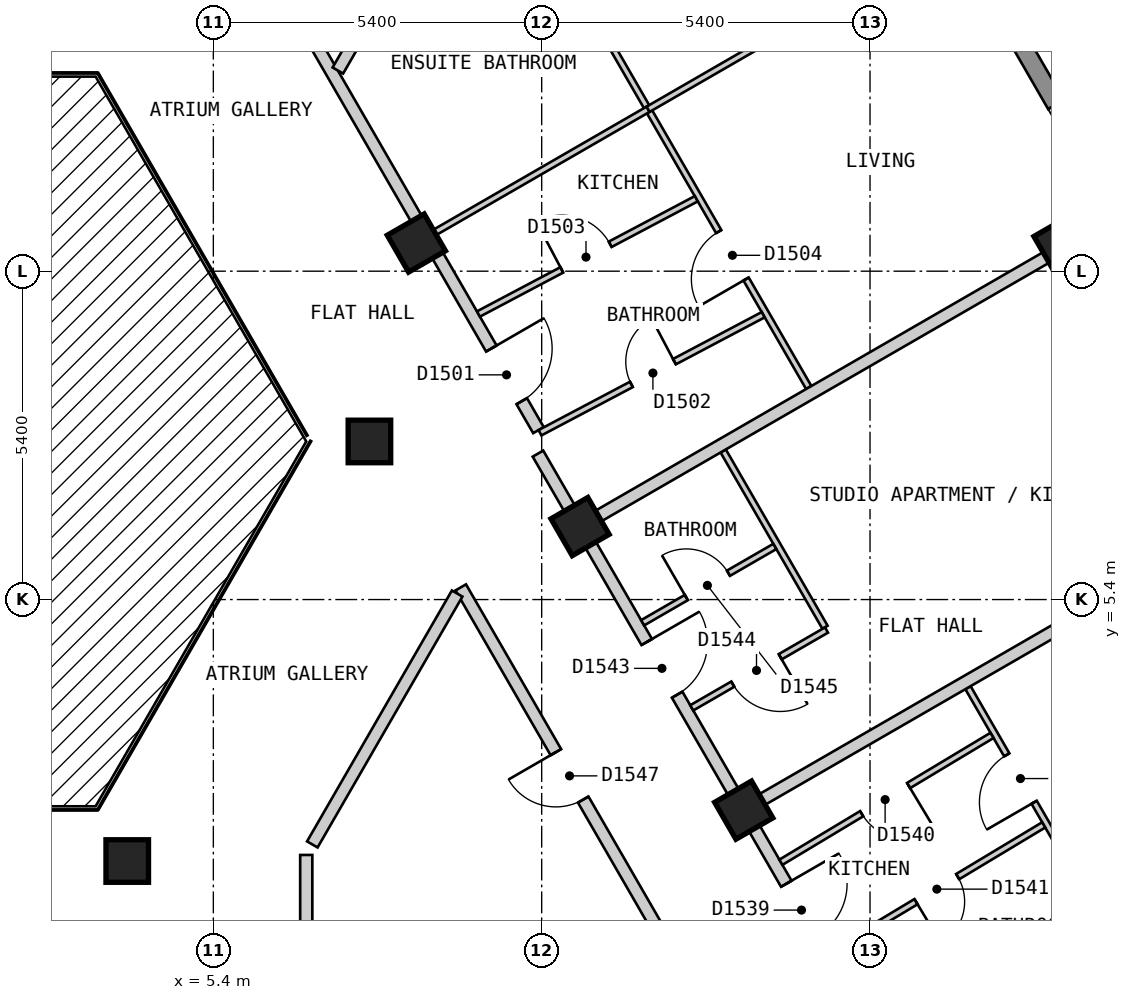
"""IFC4 building model, lengths in metres.
Left out: names, types, materials, properties, quantities, classifications, styles, units other than length and angle.
Written with IfcOpenShell. Run it as: python <this file> out.ifc"""

import sys

from ifc_helpers import new_model, si_unit, direction, frame, frame_2d, origin, origin_2d, place, context, subcontext, project, spatial, polyline, rectangle, outline, extrude, element, fill, save


model = new_model("IFC4")
c1 = context("Model", 3, precision=1e-05, world=origin(), true_north=direction((0.0, 1.0)))
c2 = subcontext(c1, "Body", "Model", "MODEL_VIEW")
j1 = project(units=[si_unit("LENGTHUNIT", "METRE"), si_unit("PLANEANGLEUNIT", "RADIAN")], contexts=[c1])
p1 = place(None, origin())
s1 = spatial("IfcSite", under=j1, at=p1, CompositionType="ELEMENT")
p2 = place(p1, origin())
s2 = spatial("IfcBuilding", under=s1, at=p2, CompositionType="ELEMENT")
p3 = place(p2, frame((0.0, 0.0, 184.2)))
s3 = spatial("IfcBuildingStorey", under=s2, at=p3, CompositionType="ELEMENT", Elevation=184.2)
p4 = place(p3, frame((19.442, 11.225, 0.0), z_axis=(0.0, 0.0, 1.0), x_axis=(-0.5, 0.866025403784, 0.0)))
e1 = element("IfcColumn", 1, at=p4, inside=s3, PredefinedType="COLUMN", context=c2, shape_type="SweptSolid", body=[
    extrude(rectangle(XDim=0.8, YDim=0.8, at=origin_2d()), origin(), (0.0, 0.0, 1.0), 3.0),
])
for number, where, z_axis, x_axis in (
    (2, (14.123, 1.937, 0.0), (0.0, 0.0, 1.0), (-0.5, 0.866, 0.0)),
    (3, (3.984, 1.1, 0.0), (0.0, 0.0, 1.0), (1.0, 0.0, 0.0)),
    (4, (11.431, 6.6, 0.0), (0.0, 0.0, 1.0), (-0.5, 0.866, 0.0)),
    (5, (7.967, 8.0, 0.0), (0.0, 0.0, 1.0), (1.0, 0.0, 0.0)),
    (6, (8.739, 11.263, 0.0), (0.0, 0.0, 1.0), (-0.5, 0.866, 0.0)),
):
    element("IfcColumn", number, at=place(p3, frame(where, z_axis=z_axis, x_axis=x_axis)), inside=s3, PredefinedType="COLUMN", context=c2, shape_type="SweptSolid", body=[
        extrude(rectangle(XDim=0.7, YDim=0.7, at=origin_2d()), origin(), (0.0, 0.0, 1.0), 3.0),
    ])
p5 = place(p3, frame((26.024, 1.825, 0.0), z_axis=(0.0, 0.0, 1.0), x_axis=(-0.500010537973, 0.866019319597, 0.0)))
e7 = element("IfcWall", 7, at=p5, inside=s3, PredefinedType="SOLIDWALL", context=c2, shape_type="SweptSolid", body=[
    extrude(outline(polyline([(0.0, -0.15), (22.863, -0.15), (22.783, 0.15), (0.08, 0.15), (0.0, -0.15)])), origin(), (0.0, 0.0, 1.0), 2.7),
])
p6 = place(p5, frame((1.259, 0.0, 0.15)))
e8 = element("IfcOpeningElement", 8, at=p6, cuts=e7, PredefinedType="OPENING", context=c2, shape_type="SweptSolid", body=[
    extrude(rectangle(XDim=1.5, YDim=2.1, at=frame_2d((0.75, 1.05))), frame((0.0, 0.16, 0.0), z_axis=(0.0, -1.0, 0.0), x_axis=(1.0, 0.0, 0.0)), (0.0, 0.0, 1.0), 0.32),
])
p7 = place(p5, frame((3.952, 0.0, 0.15)))
e9 = element("IfcOpeningElement", 9, at=p7, cuts=e7, PredefinedType="OPENING", context=c2, shape_type="SweptSolid", body=[
    extrude(rectangle(XDim=1.5, YDim=2.1, at=frame_2d((0.75, 1.05))), frame((0.0, 0.16, 0.0), z_axis=(0.0, -1.0, 0.0), x_axis=(1.0, 0.0, 0.0)), (0.0, 0.0, 1.0), 0.32),
])
p8 = place(p5, frame((6.644, 0.0, 0.15)))
e10 = element("IfcOpeningElement", 10, at=p8, cuts=e7, PredefinedType="OPENING", context=c2, shape_type="SweptSolid", body=[
    extrude(rectangle(XDim=1.5, YDim=2.1, at=frame_2d((0.75, 1.05))), frame((0.0, 0.16, 0.0), z_axis=(0.0, -1.0, 0.0), x_axis=(1.0, 0.0, 0.0)), (0.0, 0.0, 1.0), 0.32),
])
p9 = place(p5, frame((9.335, 0.0, 0.15)))
e11 = element("IfcOpeningElement", 11, at=p9, cuts=e7, PredefinedType="OPENING", context=c2, shape_type="SweptSolid", body=[
    extrude(rectangle(XDim=1.5, YDim=2.1, at=frame_2d((0.75, 1.05))), frame((0.0, 0.16, 0.0), z_axis=(0.0, -1.0, 0.0), x_axis=(1.0, 0.0, 0.0)), (0.0, 0.0, 1.0), 0.32),
])
p10 = place(p5, frame((12.028, 0.0, 0.15)))
e12 = element("IfcOpeningElement", 12, at=p10, cuts=e7, PredefinedType="OPENING", context=c2, shape_type="SweptSolid", body=[
    extrude(rectangle(XDim=1.5, YDim=2.1, at=frame_2d((0.75, 1.05))), frame((0.0, 0.16, 0.0), z_axis=(0.0, -1.0, 0.0), x_axis=(1.0, 0.0, 0.0)), (0.0, 0.0, 1.0), 0.32),
])
p11 = place(p5, frame((14.72, 0.0, 0.15)))
e13 = element("IfcOpeningElement", 13, at=p11, cuts=e7, PredefinedType="OPENING", context=c2, shape_type="SweptSolid", body=[
    extrude(rectangle(XDim=1.5, YDim=2.1, at=frame_2d((0.75, 1.05))), frame((0.0, 0.16, 0.0), z_axis=(0.0, -1.0, 0.0), x_axis=(1.0, 0.0, 0.0)), (0.0, 0.0, 1.0), 0.32),
])
p12 = place(p5, frame((17.411, 0.0, 0.15)))
e14 = element("IfcOpeningElement", 14, at=p12, cuts=e7, PredefinedType="OPENING", context=c2, shape_type="SweptSolid", body=[
    extrude(rectangle(XDim=1.5, YDim=2.1, at=frame_2d((0.75, 1.05))), frame((0.0, 0.16, 0.0), z_axis=(0.0, -1.0, 0.0), x_axis=(1.0, 0.0, 0.0)), (0.0, 0.0, 1.0), 0.32),
])
p13 = place(p5, frame((20.104, 0.0, 0.15)))
e15 = element("IfcOpeningElement", 15, at=p13, cuts=e7, PredefinedType="OPENING", context=c2, shape_type="SweptSolid", body=[
    extrude(rectangle(XDim=1.5, YDim=2.1, at=frame_2d((0.75, 1.05))), frame((0.0, 0.16, 0.0), z_axis=(0.0, -1.0, 0.0), x_axis=(1.0, 0.0, 0.0)), (0.0, 0.0, 1.0), 0.32),
])
p14 = place(p3, frame((9.469, 5.6, 0.0), z_axis=(0.0, 0.0, 1.0), x_axis=(0.499964524401, -0.866045884662, 0.0)))
e16 = element("IfcWall", 16, at=p14, inside=s3, PredefinedType="PARTITIONING", context=c2, shape_type="SweptSolid", body=[
    extrude(rectangle(XDim=7.042, YDim=0.2, at=frame_2d((3.521, 0.0))), origin(), (0.0, 0.0, 1.0), 2.7),
])
p15 = place(p14, frame((3.129, 0.0, 0.0)))
e17 = element("IfcOpeningElement", 17, at=p15, cuts=e16, PredefinedType="OPENING", context=c2, shape_type="SweptSolid", body=[
    extrude(rectangle(XDim=0.9, YDim=2.1, at=frame_2d((0.45, 1.05))), frame((0.0, 0.11, 0.0), z_axis=(0.0, -1.0, 0.0), x_axis=(1.0, 0.0, 0.0)), (0.0, 0.0, 1.0), 0.22),
])
p16 = place(p3, frame((10.739, 7.8, 0.0), z_axis=(0.0, 0.0, 1.0), x_axis=(0.500023726918, -0.866011704609, 0.0)))
e18 = element("IfcWall", 18, at=p16, inside=s3, PredefinedType="PARTITIONING", context=c2, shape_type="SweptSolid", body=[
    extrude(rectangle(XDim=9.47, YDim=0.2, at=frame_2d((4.735, 0.0))), origin(), (0.0, 0.0, 1.0), 2.7),
])
p17 = place(p16, frame((8.168, 0.0, 0.0)))
e19 = element("IfcOpeningElement", 19, at=p17, cuts=e18, PredefinedType="OPENING", context=c2, shape_type="SweptSolid", body=[
    extrude(rectangle(XDim=1.0, YDim=2.1, at=frame_2d((0.5, 1.05))), frame((0.0, 0.11, 0.0), z_axis=(0.0, -1.0, 0.0), x_axis=(1.0, 0.0, 0.0)), (0.0, 0.0, 1.0), 0.22),
])
p18 = place(p16, frame((3.578, 0.0, 0.0)))
e20 = element("IfcOpeningElement", 20, at=p18, cuts=e18, PredefinedType="OPENING", context=c2, shape_type="SweptSolid", body=[
    extrude(rectangle(XDim=1.0, YDim=2.1, at=frame_2d((0.5, 1.05))), frame((0.0, 0.11, 0.0), z_axis=(0.0, -1.0, 0.0), x_axis=(1.0, 0.0, 0.0)), (0.0, 0.0, 1.0), 0.22),
])
p19 = place(p3, frame((5.485, 17.3, 0.0), z_axis=(0.0, 0.0, 1.0), x_axis=(0.499998905622, -0.866026035623, 0.0)))
e21 = element("IfcWall", 21, at=p19, inside=s3, PredefinedType="PARTITIONING", context=c2, shape_type="SweptSolid", body=[
    extrude(rectangle(XDim=10.524, YDim=0.2, at=frame_2d((5.262, 0.0))), origin(), (0.0, 0.0, 1.0), 2.7),
])
p20 = place(p19, frame((8.974, 0.0, 0.0)))
e22 = element("IfcOpeningElement", 22, at=p20, cuts=e21, PredefinedType="OPENING", context=c2, shape_type="SweptSolid", body=[
    extrude(rectangle(XDim=1.0, YDim=2.1, at=frame_2d((0.5, 1.05))), frame((0.0, 0.11, 0.0), z_axis=(0.0, -1.0, 0.0), x_axis=(1.0, 0.0, 0.0)), (0.0, 0.0, 1.0), 0.22),
])
p21 = place(p3, frame((7.028, 1.373, 0.0), z_axis=(0.0, 0.0, 1.0), x_axis=(0.499953126767, 0.866052464367, 0.0)))
e23 = element("IfcWall", 23, at=p21, inside=s3, PredefinedType="PARTITIONING", context=c2, shape_type="SweptSolid", body=[
    extrude(rectangle(XDim=4.764, YDim=0.2, at=frame_2d((2.382, 0.0))), origin(), (0.0, 0.0, 1.0), 2.7),
])
p22 = place(p3, frame((6.928, -2.8, 0.0), z_axis=(0.0, 0.0, 1.0), x_axis=(0.0, 1.0, 0.0)))
e24 = element("IfcWall", 24, at=p22, inside=s3, PredefinedType="PARTITIONING", context=c2, shape_type="SweptSolid", body=[
    extrude(rectangle(XDim=4.0, YDim=0.2, at=frame_2d((2.0, 0.0))), origin(), (0.0, 0.0, 1.0), 2.7),
])
p23 = place(p3, frame((13.785, 7.844, 0.0), z_axis=(0.0, 0.0, 1.0), x_axis=(0.500176784828, -0.865923312955, 0.0)))
e25 = element("IfcWall", 25, at=p23, inside=s3, PredefinedType="PARTITIONING", context=c2, shape_type="SweptSolid", body=[
    extrude(rectangle(XDim=3.349, YDim=0.1, at=frame_2d((1.674, 0.0))), origin(), (0.0, 0.0, 1.0), 2.7),
])
p24 = place(p3, frame((17.811, 3.951, 0.0), z_axis=(0.0, 0.0, 1.0), x_axis=(0.499976149225, -0.866039173598, 0.0)))
e26 = element("IfcWall", 26, at=p24, inside=s3, PredefinedType="PARTITIONING", context=c2, shape_type="SweptSolid", body=[
    extrude(rectangle(XDim=2.888, YDim=0.1, at=frame_2d((1.444, 0.0))), origin(), (0.0, 0.0, 1.0), 2.7),
])
p25 = place(p24, frame((1.276, 0.0, 0.0)))
e27 = element("IfcOpeningElement", 27, at=p25, cuts=e26, PredefinedType="OPENING", context=c2, shape_type="SweptSolid", body=[
    extrude(rectangle(XDim=0.9, YDim=2.1, at=frame_2d((0.45, 1.05))), frame((0.0, 0.06, 0.0), z_axis=(0.0, -1.0, 0.0), x_axis=(1.0, 0.0, 0.0)), (0.0, 0.0, 1.0), 0.12),
])
p26 = place(p3, frame((9.883, 18.082, 0.0), z_axis=(0.0, 0.0, 1.0), x_axis=(0.500004428835, -0.86602284678, 0.0)))
e28 = element("IfcWall", 28, at=p26, inside=s3, PredefinedType="PARTITIONING", context=c2, shape_type="SweptSolid", body=[
    extrude(rectangle(XDim=10.618, YDim=0.1, at=frame_2d((5.309, 0.0))), origin(), (0.0, 0.0, 1.0), 2.7),
])
p27 = place(p26, frame((7.657, 0.0, 0.0)))
e29 = element("IfcOpeningElement", 29, at=p27, cuts=e28, PredefinedType="OPENING", context=c2, shape_type="SweptSolid", body=[
    extrude(rectangle(XDim=0.9, YDim=2.1, at=frame_2d((0.45, 1.05))), frame((0.0, 0.06, 0.0), z_axis=(0.0, -1.0, 0.0), x_axis=(1.0, 0.0, 0.0)), (0.0, 0.0, 1.0), 0.12),
])
p28 = place(p26, frame((2.242, 0.0, 0.0)))
e30 = element("IfcOpeningElement", 30, at=p28, cuts=e28, PredefinedType="OPENING", context=c2, shape_type="SweptSolid", body=[
    extrude(rectangle(XDim=0.8, YDim=2.1, at=frame_2d((0.4, 1.05))), frame((0.0, 0.06, 0.0), z_axis=(0.0, -1.0, 0.0), x_axis=(1.0, 0.0, 0.0)), (0.0, 0.0, 1.0), 0.12),
])
p29 = place(p3, frame((9.76, 10.096, 0.0), z_axis=(0.0, 0.0, 1.0), x_axis=(0.883925629136, 0.467627503636, 0.0)))
e31 = element("IfcWall", 31, at=p29, inside=s3, PredefinedType="PARTITIONING", context=c2, shape_type="SweptSolid", body=[
    extrude(rectangle(XDim=4.052, YDim=0.1, at=frame_2d((2.026, 0.0))), origin(), (0.0, 0.0, 1.0), 2.7),
])
p30 = place(p29, frame((1.551, 0.0, 0.0)))
e32 = element("IfcOpeningElement", 32, at=p30, cuts=e31, PredefinedType="OPENING", context=c2, shape_type="SweptSolid", body=[
    extrude(rectangle(XDim=0.9, YDim=2.1, at=frame_2d((0.45, 1.05))), frame((0.0, 0.06, 0.0), z_axis=(0.0, -1.0, 0.0), x_axis=(1.0, 0.0, 0.0)), (0.0, 0.0, 1.0), 0.12),
])
p31 = place(p3, frame((10.772, 8.143, 0.0), z_axis=(0.0, 0.0, 1.0), x_axis=(0.884049480227, 0.467393320995, 0.0)))
e33 = element("IfcWall", 33, at=p31, inside=s3, PredefinedType="PARTITIONING", context=c2, shape_type="SweptSolid", body=[
    extrude(rectangle(XDim=4.153, YDim=0.1, at=frame_2d((2.076, 0.0))), origin(), (0.0, 0.0, 1.0), 2.7),
])
p32 = place(p31, frame((1.701, 0.0, 0.0)))
e34 = element("IfcOpeningElement", 34, at=p32, cuts=e33, PredefinedType="OPENING", context=c2, shape_type="SweptSolid", body=[
    extrude(rectangle(XDim=0.8, YDim=2.1, at=frame_2d((0.4, 1.05))), frame((0.0, 0.06, 0.0), z_axis=(0.0, -1.0, 0.0), x_axis=(1.0, 0.0, 0.0)), (0.0, 0.0, 1.0), 0.12),
])
p33 = place(p3, frame((13.268, 3.619, 0.0), z_axis=(0.0, 0.0, 1.0), x_axis=(0.865902724456, 0.500212426655, 0.0)))
e35 = element("IfcWall", 35, at=p33, inside=s3, PredefinedType="PARTITIONING", context=c2, shape_type="SweptSolid", body=[
    extrude(rectangle(XDim=2.559, YDim=0.1, at=frame_2d((1.28, 0.0))), origin(), (0.0, 0.0, 1.0), 2.7),
])
p34 = place(p33, frame((0.78, 0.0, 0.0)))
e36 = element("IfcOpeningElement", 36, at=p34, cuts=e35, PredefinedType="OPENING", context=c2, shape_type="SweptSolid", body=[
    extrude(rectangle(XDim=0.9, YDim=2.1, at=frame_2d((0.45, 1.05))), frame((0.0, 0.06, 0.0), z_axis=(0.0, -1.0, 0.0), x_axis=(1.0, 0.0, 0.0)), (0.0, 0.0, 1.0), 0.12),
])
p35 = place(p3, frame((12.46, 5.018, 0.0), z_axis=(0.0, 0.0, 1.0), x_axis=(0.866080321209, 0.499904868165, 0.0)))
e37 = element("IfcWall", 37, at=p35, inside=s3, PredefinedType="PARTITIONING", context=c2, shape_type="SweptSolid", body=[
    extrude(rectangle(XDim=2.51, YDim=0.1, at=frame_2d((1.255, 0.0))), origin(), (0.0, 0.0, 1.0), 2.7),
])
p36 = place(p35, frame((0.83, 0.0, 0.0)))
e38 = element("IfcOpeningElement", 38, at=p36, cuts=e37, PredefinedType="OPENING", context=c2, shape_type="SweptSolid", body=[
    extrude(rectangle(XDim=0.8, YDim=2.1, at=frame_2d((0.4, 1.05))), frame((0.0, 0.06, 0.0), z_axis=(0.0, -1.0, 0.0), x_axis=(1.0, 0.0, 0.0)), (0.0, 0.0, 1.0), 0.12),
])
p37 = place(p3, frame((8.999, 11.413, 0.0), z_axis=(0.0, 0.0, 1.0), x_axis=(0.86606561423, 0.499930346997, 0.0)))
e39 = element("IfcWall", 39, at=p37, inside=s3, PredefinedType="PARTITIONING", context=c2, shape_type="SweptSolid", body=[
    extrude(rectangle(XDim=4.1, YDim=0.1, at=frame_2d((2.05, 0.0))), origin(), (0.0, 0.0, 1.0), 2.7),
])
p38 = place(p3, frame((14.734, 1.08, 0.0), z_axis=(0.0, 0.0, 1.0), x_axis=(0.857205608004, 0.514974315482, 0.0)))
e40 = element("IfcWall", 40, at=p38, inside=s3, PredefinedType="PARTITIONING", context=c2, shape_type="SweptSolid", body=[
    extrude(rectangle(XDim=4.051, YDim=0.1, at=frame_2d((2.025, 0.0))), origin(), (0.0, 0.0, 1.0), 2.7),
])
p39 = place(p38, frame((1.55, 0.0, 0.0)))
e41 = element("IfcOpeningElement", 41, at=p39, cuts=e40, PredefinedType="OPENING", context=c2, shape_type="SweptSolid", body=[
    extrude(rectangle(XDim=0.9, YDim=2.1, at=frame_2d((0.45, 1.05))), frame((0.0, 0.06, 0.0), z_axis=(0.0, -1.0, 0.0), x_axis=(1.0, 0.0, 0.0)), (0.0, 0.0, 1.0), 0.12),
])
p40 = place(p3, frame((15.499, -0.444, 0.0), z_axis=(0.0, 0.0, 1.0), x_axis=(0.857061798163, 0.515213619899, 0.0)))
e42 = element("IfcWall", 42, at=p40, inside=s3, PredefinedType="PARTITIONING", context=c2, shape_type="SweptSolid", body=[
    extrude(rectangle(XDim=4.15, YDim=0.1, at=frame_2d((2.075, 0.0))), origin(), (0.0, 0.0, 1.0), 2.7),
])
p41 = place(p40, frame((1.7, 0.0, 0.0)))
e43 = element("IfcOpeningElement", 43, at=p41, cuts=e42, PredefinedType="OPENING", context=c2, shape_type="SweptSolid", body=[
    extrude(rectangle(XDim=0.8, YDim=2.1, at=frame_2d((0.4, 1.05))), frame((0.0, 0.06, 0.0), z_axis=(0.0, -1.0, 0.0), x_axis=(1.0, 0.0, 0.0)), (0.0, 0.0, 1.0), 0.12),
])
p42 = place(p3, frame((7.448, 14.1, 0.0), z_axis=(0.0, 0.0, 1.0), x_axis=(0.499961462843, 0.866047652079, 0.0)))
e44 = element("IfcWall", 44, at=p42, inside=s3, PredefinedType="PARTITIONING", context=c2, shape_type="SweptSolid", body=[
    extrude(rectangle(XDim=4.362, YDim=0.2, at=frame_2d((2.181, 0.0))), origin(), (0.0, 0.0, 1.0), 2.7),
])
p43 = place(p3, frame((14.21, 1.987, 0.0), z_axis=(0.0, 0.0, 1.0), x_axis=(0.866022959057, 0.500004234368, 0.0)))
e45 = element("IfcWall", 45, at=p43, inside=s3, PredefinedType="PARTITIONING", context=c2, shape_type="SweptSolid", body=[
    extrude(rectangle(XDim=10.0, YDim=0.2, at=frame_2d((5.0, 0.0))), origin(), (0.0, 0.0, 1.0), 2.7),
])
p44 = place(p3, frame((11.518, 6.65, 0.0), z_axis=(0.0, 0.0, 1.0), x_axis=(0.866016855193, 0.500014806302, 0.0)))
e46 = element("IfcWall", 46, at=p44, inside=s3, PredefinedType="PARTITIONING", context=c2, shape_type="SweptSolid", body=[
    extrude(rectangle(XDim=10.0, YDim=0.2, at=frame_2d((5.0, 0.0))), origin(), (0.0, 0.0, 1.0), 2.7),
])
p45 = place(p3, frame((12.55, 13.463, 0.0), z_axis=(0.0, 0.0, 1.0), x_axis=(0.866004402611, 0.500036373335, 0.0)))
e47 = element("IfcWall", 47, at=p45, inside=s3, PredefinedType="PARTITIONING", context=c2, shape_type="SweptSolid", body=[
    extrude(rectangle(XDim=5.7, YDim=0.1, at=frame_2d((2.85, 0.0))), origin(), (0.0, 0.0, 1.0), 2.7),
])
p46 = place(p45, frame((2.4, 0.0, 0.0)))
e48 = element("IfcOpeningElement", 48, at=p46, cuts=e47, PredefinedType="OPENING", context=c2, shape_type="SweptSolid", body=[
    extrude(rectangle(XDim=0.9, YDim=2.1, at=frame_2d((0.45, 1.05))), frame((0.0, 0.06, 0.0), z_axis=(0.0, -1.0, 0.0), x_axis=(1.0, 0.0, 0.0)), (0.0, 0.0, 1.0), 0.12),
])
p47 = place(p20, origin())
e49 = element("IfcDoor", 49, at=p47, inside=s3, OperationType="SINGLE_SWING_LEFT", PredefinedType="DOOR", context=c2, shape_type="SweptSolid", body=[
    extrude(rectangle(XDim=1.0, YDim=2.1, at=frame_2d((0.5, 1.05))), frame((0.0, 0.025, 0.0), z_axis=(0.0, -1.0, 0.0), x_axis=(1.0, 0.0, 0.0)), (0.0, 0.0, 1.0), 0.05),
])
fill(e22, e49)
p48 = place(p32, origin())
e50 = element("IfcDoor", 50, at=p48, inside=s3, OperationType="SINGLE_SWING_RIGHT", PredefinedType="DOOR", context=c2, shape_type="SweptSolid", body=[
    extrude(rectangle(XDim=0.8, YDim=2.1, at=frame_2d((0.4, 1.05))), frame((0.0, 0.025, 0.0), z_axis=(0.0, -1.0, 0.0), x_axis=(1.0, 0.0, 0.0)), (0.0, 0.0, 1.0), 0.05),
])
fill(e34, e50)
p49 = place(p30, origin())
e51 = element("IfcDoor", 51, at=p49, inside=s3, OperationType="SINGLE_SWING_LEFT", PredefinedType="DOOR", context=c2, shape_type="SweptSolid", body=[
    extrude(rectangle(XDim=0.9, YDim=2.1, at=frame_2d((0.45, 1.05))), frame((0.0, 0.025, 0.0), z_axis=(0.0, -1.0, 0.0), x_axis=(1.0, 0.0, 0.0)), (0.0, 0.0, 1.0), 0.05),
])
fill(e32, e51)
p50 = place(p27, origin())
e52 = element("IfcDoor", 52, at=p50, inside=s3, OperationType="SINGLE_SWING_RIGHT", PredefinedType="DOOR", context=c2, shape_type="SweptSolid", body=[
    extrude(rectangle(XDim=0.9, YDim=2.1, at=frame_2d((0.45, 1.05))), frame((0.0, 0.025, 0.0), z_axis=(0.0, -1.0, 0.0), x_axis=(1.0, 0.0, 0.0)), (0.0, 0.0, 1.0), 0.05),
])
fill(e29, e52)
p51 = place(p17, origin())
e53 = element("IfcDoor", 53, at=p51, inside=s3, OperationType="SINGLE_SWING_LEFT", PredefinedType="DOOR", context=c2, shape_type="SweptSolid", body=[
    extrude(rectangle(XDim=1.0, YDim=2.1, at=frame_2d((0.5, 1.05))), frame((0.0, 0.025, 0.0), z_axis=(0.0, -1.0, 0.0), x_axis=(1.0, 0.0, 0.0)), (0.0, 0.0, 1.0), 0.05),
])
fill(e19, e53)
p52 = place(p39, origin())
e54 = element("IfcDoor", 54, at=p52, inside=s3, OperationType="SINGLE_SWING_RIGHT", PredefinedType="DOOR", context=c2, shape_type="SweptSolid", body=[
    extrude(rectangle(XDim=0.9, YDim=2.1, at=frame_2d((0.45, 1.05))), frame((0.0, 0.025, 0.0), z_axis=(0.0, -1.0, 0.0), x_axis=(1.0, 0.0, 0.0)), (0.0, 0.0, 1.0), 0.05),
])
fill(e41, e54)
p53 = place(p41, origin())
e55 = element("IfcDoor", 55, at=p53, inside=s3, OperationType="SINGLE_SWING_LEFT", PredefinedType="DOOR", context=c2, shape_type="SweptSolid", body=[
    extrude(rectangle(XDim=0.8, YDim=2.1, at=frame_2d((0.4, 1.05))), frame((0.0, 0.025, 0.0), z_axis=(0.0, -1.0, 0.0), x_axis=(1.0, 0.0, 0.0)), (0.0, 0.0, 1.0), 0.05),
])
fill(e43, e55)
p54 = place(p25, origin())
e56 = element("IfcDoor", 56, at=p54, inside=s3, OperationType="SINGLE_SWING_RIGHT", PredefinedType="DOOR", context=c2, shape_type="SweptSolid", body=[
    extrude(rectangle(XDim=0.9, YDim=2.1, at=frame_2d((0.45, 1.05))), frame((0.0, 0.025, 0.0), z_axis=(0.0, -1.0, 0.0), x_axis=(1.0, 0.0, 0.0)), (0.0, 0.0, 1.0), 0.05),
])
fill(e27, e56)
p55 = place(p18, origin())
e57 = element("IfcDoor", 57, at=p55, inside=s3, OperationType="SINGLE_SWING_LEFT", PredefinedType="DOOR", context=c2, shape_type="SweptSolid", body=[
    extrude(rectangle(XDim=1.0, YDim=2.1, at=frame_2d((0.5, 1.05))), frame((0.0, 0.025, 0.0), z_axis=(0.0, -1.0, 0.0), x_axis=(1.0, 0.0, 0.0)), (0.0, 0.0, 1.0), 0.05),
])
fill(e20, e57)
p56 = place(p34, origin())
e58 = element("IfcDoor", 58, at=p56, inside=s3, OperationType="SINGLE_SWING_RIGHT", PredefinedType="DOOR", context=c2, shape_type="SweptSolid", body=[
    extrude(rectangle(XDim=0.9, YDim=2.1, at=frame_2d((0.45, 1.05))), frame((0.0, 0.025, 0.0), z_axis=(0.0, -1.0, 0.0), x_axis=(1.0, 0.0, 0.0)), (0.0, 0.0, 1.0), 0.05),
])
fill(e36, e58)
p57 = place(p36, origin())
e59 = element("IfcDoor", 59, at=p57, inside=s3, OperationType="SINGLE_SWING_LEFT", PredefinedType="DOOR", context=c2, shape_type="SweptSolid", body=[
    extrude(rectangle(XDim=0.8, YDim=2.1, at=frame_2d((0.4, 1.05))), frame((0.0, 0.025, 0.0), z_axis=(0.0, -1.0, 0.0), x_axis=(1.0, 0.0, 0.0)), (0.0, 0.0, 1.0), 0.05),
])
fill(e38, e59)
p58 = place(p15, origin())
e60 = element("IfcDoor", 60, at=p58, inside=s3, OperationType="SINGLE_SWING_LEFT", PredefinedType="DOOR", context=c2, shape_type="SweptSolid", body=[
    extrude(rectangle(XDim=0.9, YDim=2.1, at=frame_2d((0.45, 1.05))), frame((0.0, 0.025, 0.0), z_axis=(0.0, -1.0, 0.0), x_axis=(1.0, 0.0, 0.0)), (0.0, 0.0, 1.0), 0.05),
])
fill(e17, e60)
save(model, sys.argv[1])
